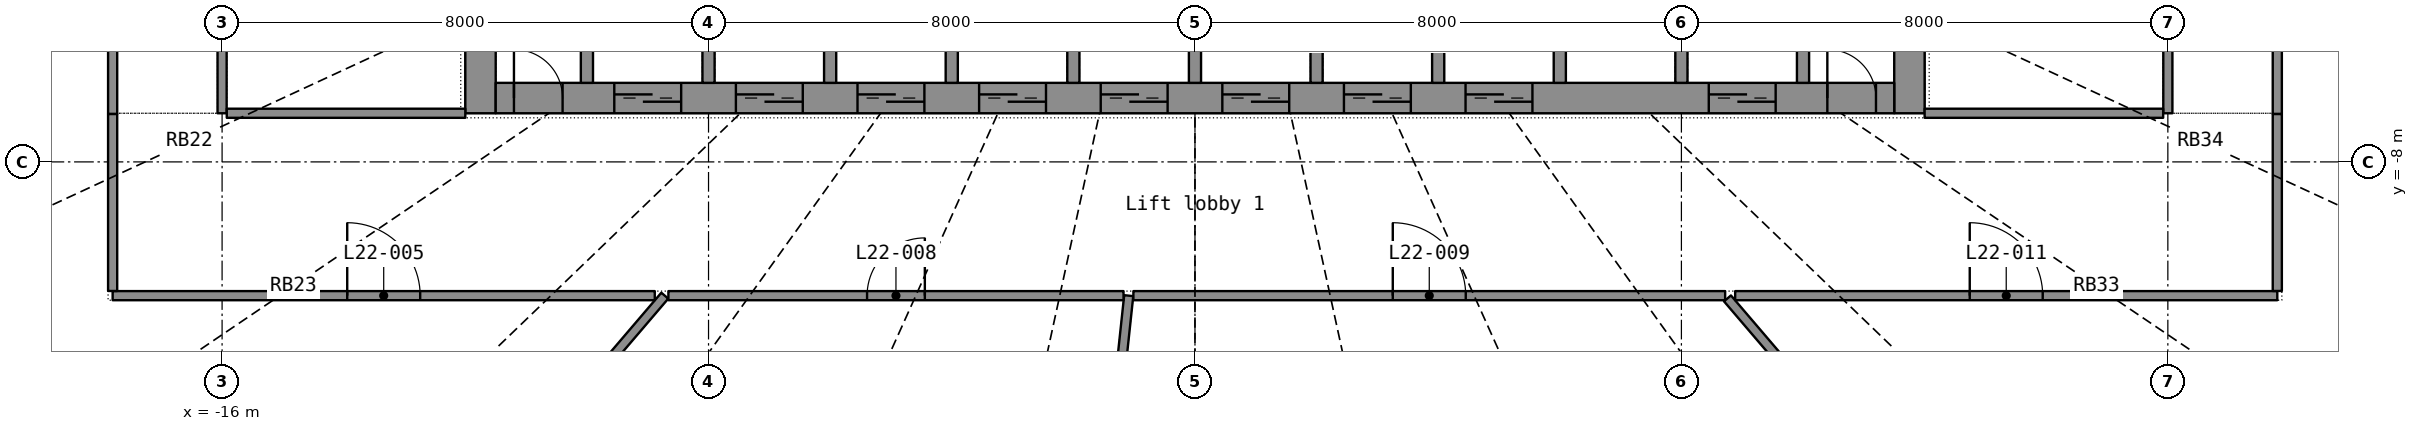
"""IFC4 building model, lengths in metres.
Left out: names, types, materials, properties, quantities, classifications, styles, units other than length and angle.
Written with IfcOpenShell. Run it as: python <this file> out.ifc"""

import sys

from ifc_helpers import new_model, si_unit, direction, frame, frame_2d, origin, place, context, subcontext, project, spatial, rectangle, extrude, element, fill, save


model = new_model("IFC4")
c1 = context("Model", 3, precision=1e-05, world=origin(), true_north=direction((0.0, 1.0)))
c2 = subcontext(c1, "Body", "Model", "MODEL_VIEW")
j1 = project(units=[si_unit("LENGTHUNIT", "METRE"), si_unit("PLANEANGLEUNIT", "RADIAN")], contexts=[c1])
p1 = place(None, origin())
s1 = spatial("IfcSite", under=j1, at=p1, CompositionType="ELEMENT")
p2 = place(p1, origin())
s2 = spatial("IfcBuilding", under=s1, at=p2, CompositionType="ELEMENT")
p3 = place(p2, frame((0.0, 0.0, 97.1)))
s3 = spatial("IfcBuildingStorey", under=s2, at=p3, CompositionType="ELEMENT", Elevation=97.1)
p4 = place(p3, frame((-11.75, -7.2, 0.0), z_axis=(0.0, 0.0, 1.0), x_axis=(0.0, 1.0, 0.0)))
e1 = element("IfcWall", 1, at=p4, inside=s3, PredefinedType="SHEAR", context=c2, shape_type="SweptSolid", body=[
    extrude(rectangle(XDim=14.4, YDim=0.5, at=frame_2d((7.2, 0.0))), origin(), (0.0, 0.0, 1.0), 3.3),
])
p5 = place(p4, frame((6.5, 0.0, 0.0)))
e2 = element("IfcOpeningElement", 2, at=p5, cuts=e1, PredefinedType="OPENING", context=c2, shape_type="SweptSolid", body=[
    extrude(rectangle(XDim=1.4, YDim=2.2, at=frame_2d((0.7, 1.1))), frame((0.0, 0.26, 0.0), z_axis=(0.0, -1.0, 0.0), x_axis=(1.0, 0.0, 0.0)), (0.0, 0.0, 1.0), 0.52),
])
p6 = place(p3, frame((11.75, -7.2, 0.0), z_axis=(0.0, 0.0, 1.0), x_axis=(0.0, 1.0, 0.0)))
e3 = element("IfcWall", 3, at=p6, inside=s3, PredefinedType="SHEAR", context=c2, shape_type="SweptSolid", body=[
    extrude(rectangle(XDim=14.4, YDim=0.5, at=frame_2d((7.2, 0.0))), origin(), (0.0, 0.0, 1.0), 3.3),
])
p7 = place(p6, frame((6.5, 0.0, 0.0)))
e4 = element("IfcOpeningElement", 4, at=p7, cuts=e3, PredefinedType="OPENING", context=c2, shape_type="SweptSolid", body=[
    extrude(rectangle(XDim=1.4, YDim=2.2, at=frame_2d((0.7, 1.1))), frame((0.0, 0.26, 0.0), z_axis=(0.0, -1.0, 0.0), x_axis=(1.0, 0.0, 0.0)), (0.0, 0.0, 1.0), 0.52),
])
p8 = place(p3, frame((-11.5, -6.95, 0.0), z_axis=(0.0, 0.0, 1.0), x_axis=(1.0, 0.0, 0.0)))
e5 = element("IfcWall", 5, at=p8, inside=s3, PredefinedType="SHEAR", context=c2, shape_type="SweptSolid", body=[
    extrude(rectangle(XDim=23.0, YDim=0.5, at=frame_2d((11.5, 0.0))), origin(), (0.0, 0.0, 1.0), 3.3),
])
p9 = place(p8, frame((1.95, 0.0, 0.0)))
e6 = element("IfcOpeningElement", 6, at=p9, cuts=e5, PredefinedType="OPENING", context=c2, shape_type="SweptSolid", body=[
    extrude(rectangle(XDim=1.1, YDim=2.2, at=frame_2d((0.55, 1.1))), frame((0.0, 0.26, 0.0), z_axis=(0.0, -1.0, 0.0), x_axis=(1.0, 0.0, 0.0)), (0.0, 0.0, 1.0), 0.52),
])
p10 = place(p8, frame((3.95, 0.0, 0.0)))
e7 = element("IfcOpeningElement", 7, at=p10, cuts=e5, PredefinedType="OPENING", context=c2, shape_type="SweptSolid", body=[
    extrude(rectangle(XDim=1.1, YDim=2.2, at=frame_2d((0.55, 1.1))), frame((0.0, 0.26, 0.0), z_axis=(0.0, -1.0, 0.0), x_axis=(1.0, 0.0, 0.0)), (0.0, 0.0, 1.0), 0.52),
])
p11 = place(p8, frame((5.95, 0.0, 0.0)))
e8 = element("IfcOpeningElement", 8, at=p11, cuts=e5, PredefinedType="OPENING", context=c2, shape_type="SweptSolid", body=[
    extrude(rectangle(XDim=1.1, YDim=2.2, at=frame_2d((0.55, 1.1))), frame((0.0, 0.26, 0.0), z_axis=(0.0, -1.0, 0.0), x_axis=(1.0, 0.0, 0.0)), (0.0, 0.0, 1.0), 0.52),
])
p12 = place(p8, frame((7.95, 0.0, 0.0)))
e9 = element("IfcOpeningElement", 9, at=p12, cuts=e5, PredefinedType="OPENING", context=c2, shape_type="SweptSolid", body=[
    extrude(rectangle(XDim=1.1, YDim=2.2, at=frame_2d((0.55, 1.1))), frame((0.0, 0.26, 0.0), z_axis=(0.0, -1.0, 0.0), x_axis=(1.0, 0.0, 0.0)), (0.0, 0.0, 1.0), 0.52),
])
p13 = place(p8, frame((9.95, 0.0, 0.0)))
e10 = element("IfcOpeningElement", 10, at=p13, cuts=e5, PredefinedType="OPENING", context=c2, shape_type="SweptSolid", body=[
    extrude(rectangle(XDim=1.1, YDim=2.2, at=frame_2d((0.55, 1.1))), frame((0.0, 0.26, 0.0), z_axis=(0.0, -1.0, 0.0), x_axis=(1.0, 0.0, 0.0)), (0.0, 0.0, 1.0), 0.52),
])
p14 = place(p8, frame((11.95, 0.0, 0.0)))
e11 = element("IfcOpeningElement", 11, at=p14, cuts=e5, PredefinedType="OPENING", context=c2, shape_type="SweptSolid", body=[
    extrude(rectangle(XDim=1.1, YDim=2.2, at=frame_2d((0.55, 1.1))), frame((0.0, 0.26, 0.0), z_axis=(0.0, -1.0, 0.0), x_axis=(1.0, 0.0, 0.0)), (0.0, 0.0, 1.0), 0.52),
])
p15 = place(p8, frame((13.95, 0.0, 0.0)))
e12 = element("IfcOpeningElement", 12, at=p15, cuts=e5, PredefinedType="OPENING", context=c2, shape_type="SweptSolid", body=[
    extrude(rectangle(XDim=1.1, YDim=2.2, at=frame_2d((0.55, 1.1))), frame((0.0, 0.26, 0.0), z_axis=(0.0, -1.0, 0.0), x_axis=(1.0, 0.0, 0.0)), (0.0, 0.0, 1.0), 0.52),
])
p16 = place(p8, frame((15.95, 0.0, 0.0)))
e13 = element("IfcOpeningElement", 13, at=p16, cuts=e5, PredefinedType="OPENING", context=c2, shape_type="SweptSolid", body=[
    extrude(rectangle(XDim=1.1, YDim=2.2, at=frame_2d((0.55, 1.1))), frame((0.0, 0.26, 0.0), z_axis=(0.0, -1.0, 0.0), x_axis=(1.0, 0.0, 0.0)), (0.0, 0.0, 1.0), 0.52),
])
p17 = place(p8, frame((19.95, 0.0, 0.0)))
e14 = element("IfcOpeningElement", 14, at=p17, cuts=e5, PredefinedType="OPENING", context=c2, shape_type="SweptSolid", body=[
    extrude(rectangle(XDim=1.1, YDim=2.2, at=frame_2d((0.55, 1.1))), frame((0.0, 0.26, 0.0), z_axis=(0.0, -1.0, 0.0), x_axis=(1.0, 0.0, 0.0)), (0.0, 0.0, 1.0), 0.52),
])
p18 = place(p8, frame((0.3, 0.0, 0.0)))
e15 = element("IfcOpeningElement", 15, at=p18, cuts=e5, PredefinedType="OPENING", context=c2, shape_type="SweptSolid", body=[
    extrude(rectangle(XDim=0.8, YDim=2.05, at=frame_2d((0.4, 1.025))), frame((0.0, 0.26, 0.0), z_axis=(0.0, -1.0, 0.0), x_axis=(1.0, 0.0, 0.0)), (0.0, 0.0, 1.0), 0.52),
])
p19 = place(p8, frame((21.9, 0.0, 0.0)))
e16 = element("IfcOpeningElement", 16, at=p19, cuts=e5, PredefinedType="OPENING", context=c2, shape_type="SweptSolid", body=[
    extrude(rectangle(XDim=0.8, YDim=2.05, at=frame_2d((0.4, 1.025))), frame((0.0, 0.26, 0.0), z_axis=(0.0, -1.0, 0.0), x_axis=(1.0, 0.0, 0.0)), (0.0, 0.0, 1.0), 0.52),
])
for number, where, z_axis, x_axis in (
    (17, (-10.0, -6.7, 0.0), (0.0, 0.0, 1.0), (0.0, 1.0, 0.0)),
    (18, (-8.0, -6.7, 0.0), (0.0, 0.0, 1.0), (0.0, 1.0, 0.0)),
    (19, (-6.0, -6.7, 0.0), (0.0, 0.0, 1.0), (0.0, 1.0, 0.0)),
    (20, (-4.0, -6.7, 0.0), (0.0, 0.0, 1.0), (0.0, 1.0, 0.0)),
    (21, (-2.0, -6.7, 0.0), (0.0, 0.0, 1.0), (0.0, 1.0, 0.0)),
    (22, (0.0, -6.7, 0.0), (0.0, 0.0, 1.0), (0.0, 1.0, 0.0)),
    (23, (2.0, -6.7, 0.0), (0.0, 0.0, 1.0), (0.0, 1.0, 0.0)),
    (24, (4.0, -6.7, 0.0), (0.0, 0.0, 1.0), (0.0, 1.0, 0.0)),
    (25, (6.0, -6.7, 0.0), (0.0, 0.0, 1.0), (0.0, 1.0, 0.0)),
    (26, (8.0, -6.7, 0.0), (0.0, 0.0, 1.0), (0.0, 1.0, 0.0)),
    (27, (10.0, -6.7, 0.0), (0.0, 0.0, 1.0), (0.0, 1.0, 0.0)),
):
    element("IfcWall", number, at=place(p3, frame(where, z_axis=z_axis, x_axis=x_axis)), inside=s3, PredefinedType="SHEAR", context=c2, shape_type="SweptSolid", body=[
        extrude(rectangle(XDim=2.8, YDim=0.2, at=frame_2d((1.4, 0.0))), origin(), (0.0, 0.0, 1.0), 3.3),
    ])
p20 = place(p3, frame((-2.252, -21.088, 0.0), z_axis=(0.0, 0.0, 1.0), x_axis=(0.106196959, 0.994345114, 0.0)))
e28 = element("IfcWall", 28, at=p20, inside=s3, PredefinedType="PARTITIONING", context=c2, shape_type="SweptSolid", body=[
    extrude(rectangle(XDim=10.95, YDim=0.15, at=frame_2d((5.475, 0.0))), origin(), (0.0, 0.0, 1.0), 2.4),
])
p21 = place(p3, frame((-1.013, -10.2, 0.0), z_axis=(0.0, 0.0, 1.0), x_axis=(1.0, 0.0, 0.0)))
e29 = element("IfcWall", 29, at=p21, inside=s3, PredefinedType="PARTITIONING", context=c2, shape_type="SweptSolid", body=[
    extrude(rectangle(XDim=9.732, YDim=0.15, at=frame_2d((4.866, 0.0))), origin(), (0.0, 0.0, 1.0), 2.4),
])
p22 = place(p21, frame((4.266, 0.0, 0.0)))
e30 = element("IfcOpeningElement", 30, at=p22, cuts=e29, PredefinedType="OPENING", context=c2, shape_type="SweptSolid", body=[
    extrude(rectangle(XDim=1.2, YDim=2.2, at=frame_2d((0.6, 1.1))), frame((0.0, 0.085, 0.0), z_axis=(0.0, -1.0, 0.0), x_axis=(1.0, 0.0, 0.0)), (0.0, 0.0, 1.0), 0.17),
])
p23 = place(p3, frame((14.828, -17.346, 0.0), z_axis=(0.0, 0.0, 1.0), x_axis=(-0.649770677, 0.760130296, 0.0)))
e31 = element("IfcWall", 31, at=p23, inside=s3, PredefinedType="PARTITIONING", context=c2, shape_type="SweptSolid", body=[
    extrude(rectangle(XDim=9.342, YDim=0.15, at=frame_2d((4.671, 0.0))), origin(), (0.0, 0.0, 1.0), 2.4),
])
p24 = place(p3, frame((-14.827, -17.345, 0.0), z_axis=(0.0, 0.0, 1.0), x_axis=(0.649770499, 0.760130448, 0.0)))
e32 = element("IfcWall", 32, at=p24, inside=s3, PredefinedType="PARTITIONING", context=c2, shape_type="SweptSolid", body=[
    extrude(rectangle(XDim=9.4, YDim=0.15, at=frame_2d((4.7, 0.0))), origin(), (0.0, 0.0, 1.0), 2.4),
])
p25 = place(p3, frame((-17.8, -10.2, 0.0), z_axis=(0.0, 0.0, 1.0), x_axis=(1.0, 0.0, 0.0)))
e33 = element("IfcWall", 33, at=p25, inside=s3, PredefinedType="PARTITIONING", context=c2, shape_type="SweptSolid", body=[
    extrude(rectangle(XDim=8.916, YDim=0.15, at=frame_2d((4.458, 0.0))), origin(), (0.0, 0.0, 1.0), 2.4),
])
p26 = place(p25, frame((3.858, 0.0, 0.0)))
e34 = element("IfcOpeningElement", 34, at=p26, cuts=e33, PredefinedType="OPENING", context=c2, shape_type="SweptSolid", body=[
    extrude(rectangle(XDim=1.2, YDim=2.2, at=frame_2d((0.6, 1.1))), frame((0.0, 0.085, 0.0), z_axis=(0.0, -1.0, 0.0), x_axis=(1.0, 0.0, 0.0)), (0.0, 0.0, 1.0), 0.17),
])
p27 = place(p3, frame((8.884, -10.2, 0.0), z_axis=(0.0, 0.0, 1.0), x_axis=(1.0, 0.0, 0.0)))
e35 = element("IfcWall", 35, at=p27, inside=s3, PredefinedType="PARTITIONING", context=c2, shape_type="SweptSolid", body=[
    extrude(rectangle(XDim=8.916, YDim=0.15, at=frame_2d((4.458, 0.0))), origin(), (0.0, 0.0, 1.0), 2.4),
])
p28 = place(p27, frame((3.858, 0.0, 0.0)))
e36 = element("IfcOpeningElement", 36, at=p28, cuts=e35, PredefinedType="OPENING", context=c2, shape_type="SweptSolid", body=[
    extrude(rectangle(XDim=1.2, YDim=2.2, at=frame_2d((0.6, 1.1))), frame((0.0, 0.085, 0.0), z_axis=(0.0, -1.0, 0.0), x_axis=(1.0, 0.0, 0.0)), (0.0, 0.0, 1.0), 0.17),
])
p29 = place(p3, frame((-8.66, -10.2, 0.0), z_axis=(0.0, 0.0, 1.0), x_axis=(1.0, 0.0, 0.0)))
e37 = element("IfcWall", 37, at=p29, inside=s3, PredefinedType="PARTITIONING", context=c2, shape_type="SweptSolid", body=[
    extrude(rectangle(XDim=7.486, YDim=0.15, at=frame_2d((3.743, 0.0))), origin(), (0.0, 0.0, 1.0), 2.4),
])
p30 = place(p29, frame((3.268, 0.0, 0.0)))
e38 = element("IfcOpeningElement", 38, at=p30, cuts=e37, PredefinedType="OPENING", context=c2, shape_type="SweptSolid", body=[
    extrude(rectangle(XDim=0.95, YDim=2.15, at=frame_2d((0.475, 1.075))), frame((0.0, 0.085, 0.0), z_axis=(0.0, -1.0, 0.0), x_axis=(1.0, 0.0, 0.0)), (0.0, 0.0, 1.0), 0.17),
])
p31 = place(p3, frame((-16.0, -7.2, 0.0), z_axis=(0.0, 0.0, 1.0), x_axis=(0.0, 1.0, 0.0)))
e39 = element("IfcWall", 39, at=p31, inside=s3, PredefinedType="PARTITIONING", context=c2, shape_type="SweptSolid", body=[
    extrude(rectangle(XDim=6.053, YDim=0.15, at=frame_2d((3.027, 0.0))), origin(), (0.0, 0.0, 1.0), 2.4),
])
p32 = place(p31, frame((2.427, 0.0, 0.0)))
e40 = element("IfcOpeningElement", 40, at=p32, cuts=e39, PredefinedType="OPENING", context=c2, shape_type="SweptSolid", body=[
    extrude(rectangle(XDim=1.2, YDim=2.2, at=frame_2d((0.6, 1.1))), frame((0.0, 0.085, 0.0), z_axis=(0.0, -1.0, 0.0), x_axis=(1.0, 0.0, 0.0)), (0.0, 0.0, 1.0), 0.17),
])
p33 = place(p3, frame((16.0, -1.146, 0.0), z_axis=(0.0, 0.0, 1.0), x_axis=(0.0, -1.0, 0.0)))
e41 = element("IfcWall", 41, at=p33, inside=s3, PredefinedType="PARTITIONING", context=c2, shape_type="SweptSolid", body=[
    extrude(rectangle(XDim=6.053, YDim=0.15, at=frame_2d((3.027, 0.0))), origin(), (0.0, 0.0, 1.0), 2.4),
])
p34 = place(p33, frame((2.427, 0.0, 0.0)))
e42 = element("IfcOpeningElement", 42, at=p34, cuts=e41, PredefinedType="OPENING", context=c2, shape_type="SweptSolid", body=[
    extrude(rectangle(XDim=1.2, YDim=2.2, at=frame_2d((0.6, 1.1))), frame((0.0, 0.085, 0.0), z_axis=(0.0, -1.0, 0.0), x_axis=(1.0, 0.0, 0.0)), (0.0, 0.0, 1.0), 0.17),
])
p35 = place(p3, frame((-17.8, -1.276, 0.0), z_axis=(0.0, 0.0, 1.0), x_axis=(0.0, -1.0, 0.0)))
e43 = element("IfcWall", 43, at=p35, inside=s3, PredefinedType="PARTITIONING", context=c2, shape_type="SweptSolid", body=[
    extrude(rectangle(XDim=5.936, YDim=0.15, at=frame_2d((2.968, 0.0))), origin(), (0.0, 0.0, 1.0), 2.4),
])
p36 = place(p35, frame((2.368, 0.0, 0.0)))
e44 = element("IfcOpeningElement", 44, at=p36, cuts=e43, PredefinedType="OPENING", context=c2, shape_type="SweptSolid", body=[
    extrude(rectangle(XDim=1.2, YDim=2.2, at=frame_2d((0.6, 1.1))), frame((0.0, 0.085, 0.0), z_axis=(0.0, -1.0, 0.0), x_axis=(1.0, 0.0, 0.0)), (0.0, 0.0, 1.0), 0.17),
])
p37 = place(p3, frame((17.8, -7.212, 0.0), z_axis=(0.0, 0.0, 1.0), x_axis=(0.0, 1.0, 0.0)))
e45 = element("IfcWall", 45, at=p37, inside=s3, PredefinedType="PARTITIONING", context=c2, shape_type="SweptSolid", body=[
    extrude(rectangle(XDim=5.789, YDim=0.15, at=frame_2d((2.894, 0.0))), origin(), (0.0, 0.0, 1.0), 2.4),
])
p38 = place(p37, frame((2.294, 0.0, 0.0)))
e46 = element("IfcOpeningElement", 46, at=p38, cuts=e45, PredefinedType="OPENING", context=c2, shape_type="SweptSolid", body=[
    extrude(rectangle(XDim=1.2, YDim=2.2, at=frame_2d((0.6, 1.1))), frame((0.0, 0.085, 0.0), z_axis=(0.0, -1.0, 0.0), x_axis=(1.0, 0.0, 0.0)), (0.0, 0.0, 1.0), 0.17),
])
for number, where, z_axis, x_axis in (
    (47, (-12.0, -7.2, 0.0), (0.0, 0.0, 1.0), (-1.0, 0.0, 0.0)),
    (48, (15.923, -7.2, 0.0), (0.0, 0.0, 1.0), (-1.0, 0.0, 0.0)),
):
    element("IfcWall", number, at=place(p3, frame(where, z_axis=z_axis, x_axis=x_axis)), inside=s3, PredefinedType="PARTITIONING", context=c2, shape_type="SweptSolid", body=[
        extrude(rectangle(XDim=3.923, YDim=0.15, at=frame_2d((1.961, 0.0))), origin(), (0.0, 0.0, 1.0), 2.4),
    ])
for number, where, z_axis, x_axis in (
    (49, (-17.8, -7.213, 0.0), (0.0, 0.0, 1.0), (0.0, -1.0, 0.0)),
    (50, (17.8, -10.123, 0.0), (0.0, 0.0, 1.0), (0.0, 1.0, 0.0)),
):
    element("IfcWall", number, at=place(p3, frame(where, z_axis=z_axis, x_axis=x_axis)), inside=s3, PredefinedType="PARTITIONING", context=c2, shape_type="SweptSolid", body=[
        extrude(rectangle(XDim=2.91, YDim=0.15, at=frame_2d((1.455, 0.0))), origin(), (0.0, 0.0, 1.0), 2.4),
    ])
p39 = place(p9, origin())
e51 = element("IfcDoor", 51, at=p39, inside=s3, OperationType="DOUBLE_DOOR_SLIDING", PredefinedType="DOOR", context=c2, shape_type="SweptSolid", body=[
    extrude(rectangle(XDim=1.1, YDim=2.2, at=frame_2d((0.55, 1.1))), frame((0.0, 0.025, 0.0), z_axis=(0.0, -1.0, 0.0), x_axis=(1.0, 0.0, 0.0)), (0.0, 0.0, 1.0), 0.05),
])
fill(e6, e51)
p40 = place(p10, origin())
e52 = element("IfcDoor", 52, at=p40, inside=s3, OperationType="DOUBLE_DOOR_SLIDING", PredefinedType="DOOR", context=c2, shape_type="SweptSolid", body=[
    extrude(rectangle(XDim=1.1, YDim=2.2, at=frame_2d((0.55, 1.1))), frame((0.0, 0.025, 0.0), z_axis=(0.0, -1.0, 0.0), x_axis=(1.0, 0.0, 0.0)), (0.0, 0.0, 1.0), 0.05),
])
fill(e7, e52)
p41 = place(p11, origin())
e53 = element("IfcDoor", 53, at=p41, inside=s3, OperationType="DOUBLE_DOOR_SLIDING", PredefinedType="DOOR", context=c2, shape_type="SweptSolid", body=[
    extrude(rectangle(XDim=1.1, YDim=2.2, at=frame_2d((0.55, 1.1))), frame((0.0, 0.025, 0.0), z_axis=(0.0, -1.0, 0.0), x_axis=(1.0, 0.0, 0.0)), (0.0, 0.0, 1.0), 0.05),
])
fill(e8, e53)
p42 = place(p12, origin())
e54 = element("IfcDoor", 54, at=p42, inside=s3, OperationType="DOUBLE_DOOR_SLIDING", PredefinedType="DOOR", context=c2, shape_type="SweptSolid", body=[
    extrude(rectangle(XDim=1.1, YDim=2.2, at=frame_2d((0.55, 1.1))), frame((0.0, 0.025, 0.0), z_axis=(0.0, -1.0, 0.0), x_axis=(1.0, 0.0, 0.0)), (0.0, 0.0, 1.0), 0.05),
])
fill(e9, e54)
p43 = place(p13, origin())
e55 = element("IfcDoor", 55, at=p43, inside=s3, OperationType="DOUBLE_DOOR_SLIDING", PredefinedType="DOOR", context=c2, shape_type="SweptSolid", body=[
    extrude(rectangle(XDim=1.1, YDim=2.2, at=frame_2d((0.55, 1.1))), frame((0.0, 0.025, 0.0), z_axis=(0.0, -1.0, 0.0), x_axis=(1.0, 0.0, 0.0)), (0.0, 0.0, 1.0), 0.05),
])
fill(e10, e55)
p44 = place(p14, origin())
e56 = element("IfcDoor", 56, at=p44, inside=s3, OperationType="DOUBLE_DOOR_SLIDING", PredefinedType="DOOR", context=c2, shape_type="SweptSolid", body=[
    extrude(rectangle(XDim=1.1, YDim=2.2, at=frame_2d((0.55, 1.1))), frame((0.0, 0.025, 0.0), z_axis=(0.0, -1.0, 0.0), x_axis=(1.0, 0.0, 0.0)), (0.0, 0.0, 1.0), 0.05),
])
fill(e11, e56)
p45 = place(p15, origin())
e57 = element("IfcDoor", 57, at=p45, inside=s3, OperationType="DOUBLE_DOOR_SLIDING", PredefinedType="DOOR", context=c2, shape_type="SweptSolid", body=[
    extrude(rectangle(XDim=1.1, YDim=2.2, at=frame_2d((0.55, 1.1))), frame((0.0, 0.025, 0.0), z_axis=(0.0, -1.0, 0.0), x_axis=(1.0, 0.0, 0.0)), (0.0, 0.0, 1.0), 0.05),
])
fill(e12, e57)
p46 = place(p16, origin())
e58 = element("IfcDoor", 58, at=p46, inside=s3, OperationType="DOUBLE_DOOR_SLIDING", PredefinedType="DOOR", context=c2, shape_type="SweptSolid", body=[
    extrude(rectangle(XDim=1.1, YDim=2.2, at=frame_2d((0.55, 1.1))), frame((0.0, 0.025, 0.0), z_axis=(0.0, -1.0, 0.0), x_axis=(1.0, 0.0, 0.0)), (0.0, 0.0, 1.0), 0.05),
])
fill(e13, e58)
p47 = place(p17, origin())
e59 = element("IfcDoor", 59, at=p47, inside=s3, OperationType="DOUBLE_DOOR_SLIDING", PredefinedType="DOOR", context=c2, shape_type="SweptSolid", body=[
    extrude(rectangle(XDim=1.1, YDim=2.2, at=frame_2d((0.55, 1.1))), frame((0.0, 0.025, 0.0), z_axis=(0.0, -1.0, 0.0), x_axis=(1.0, 0.0, 0.0)), (0.0, 0.0, 1.0), 0.05),
])
fill(e14, e59)
p48 = place(p18, origin())
e60 = element("IfcDoor", 60, at=p48, inside=s3, OperationType="SINGLE_SWING_LEFT", PredefinedType="DOOR", context=c2, shape_type="SweptSolid", body=[
    extrude(rectangle(XDim=0.8, YDim=2.05, at=frame_2d((0.4, 1.025))), frame((0.0, 0.025, 0.0), z_axis=(0.0, -1.0, 0.0), x_axis=(1.0, 0.0, 0.0)), (0.0, 0.0, 1.0), 0.05),
])
fill(e15, e60)
p49 = place(p19, origin())
e61 = element("IfcDoor", 61, at=p49, inside=s3, OperationType="SINGLE_SWING_LEFT", PredefinedType="DOOR", context=c2, shape_type="SweptSolid", body=[
    extrude(rectangle(XDim=0.8, YDim=2.05, at=frame_2d((0.4, 1.025))), frame((0.0, 0.025, 0.0), z_axis=(0.0, -1.0, 0.0), x_axis=(1.0, 0.0, 0.0)), (0.0, 0.0, 1.0), 0.05),
])
fill(e16, e61)
p50 = place(p26, origin())
e62 = element("IfcDoor", 62, at=p50, inside=s3, OperationType="DOUBLE_DOOR_SINGLE_SWING", PredefinedType="DOOR", context=c2, shape_type="SweptSolid", body=[
    extrude(rectangle(XDim=1.2, YDim=2.2, at=frame_2d((0.6, 1.1))), frame((0.0, 0.025, 0.0), z_axis=(0.0, -1.0, 0.0), x_axis=(1.0, 0.0, 0.0)), (0.0, 0.0, 1.0), 0.05),
])
fill(e34, e62)
p51 = place(p30, origin())
e63 = element("IfcDoor", 63, at=p51, inside=s3, OperationType="SINGLE_SWING_RIGHT", PredefinedType="DOOR", context=c2, shape_type="SweptSolid", body=[
    extrude(rectangle(XDim=0.95, YDim=2.15, at=frame_2d((0.475, 1.075))), frame((0.0, 0.025, 0.0), z_axis=(0.0, -1.0, 0.0), x_axis=(1.0, 0.0, 0.0)), (0.0, 0.0, 1.0), 0.05),
])
fill(e38, e63)
p52 = place(p22, origin())
e64 = element("IfcDoor", 64, at=p52, inside=s3, OperationType="DOUBLE_DOOR_SINGLE_SWING", PredefinedType="DOOR", context=c2, shape_type="SweptSolid", body=[
    extrude(rectangle(XDim=1.2, YDim=2.2, at=frame_2d((0.6, 1.1))), frame((0.0, 0.025, 0.0), z_axis=(0.0, -1.0, 0.0), x_axis=(1.0, 0.0, 0.0)), (0.0, 0.0, 1.0), 0.05),
])
fill(e30, e64)
p53 = place(p28, origin())
e65 = element("IfcDoor", 65, at=p53, inside=s3, OperationType="DOUBLE_DOOR_SINGLE_SWING", PredefinedType="DOOR", context=c2, shape_type="SweptSolid", body=[
    extrude(rectangle(XDim=1.2, YDim=2.2, at=frame_2d((0.6, 1.1))), frame((0.0, 0.025, 0.0), z_axis=(0.0, -1.0, 0.0), x_axis=(1.0, 0.0, 0.0)), (0.0, 0.0, 1.0), 0.05),
])
fill(e36, e65)
save(model, sys.argv[1])
